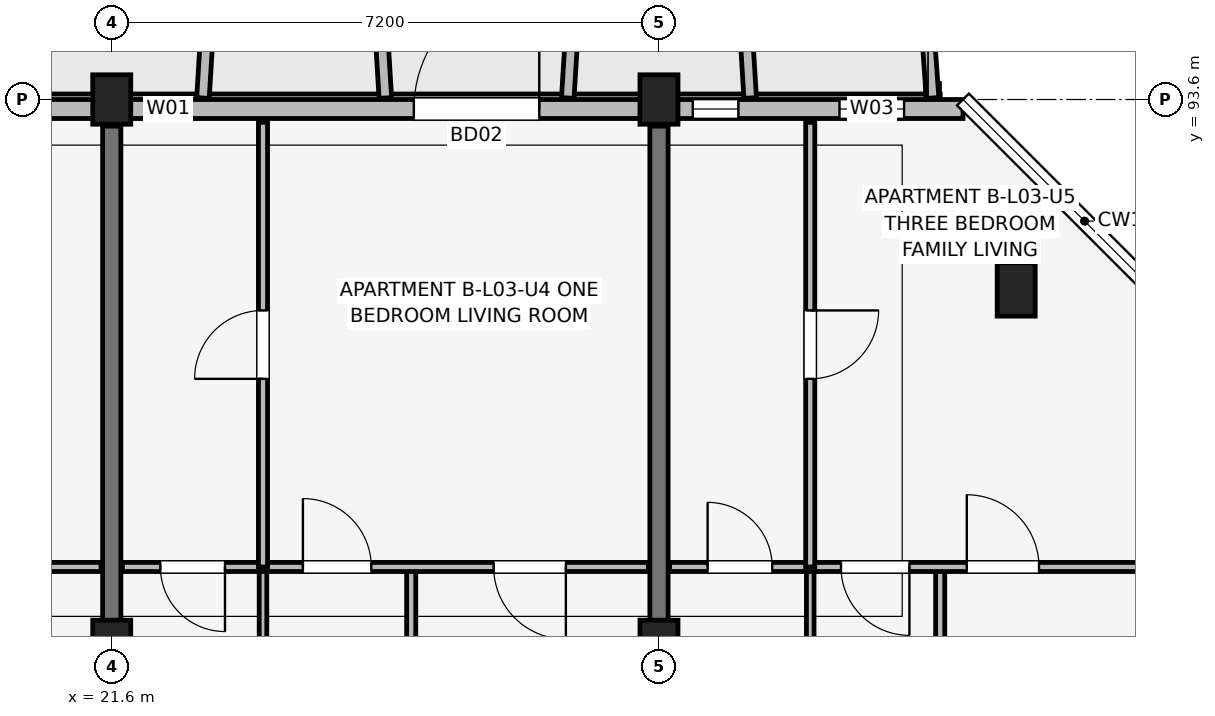
"""IFC4 building model, lengths in metres.
Left out: names, types, materials, properties, quantities, classifications, styles, units other than length and angle.
Written with IfcOpenShell. Run it as: python <this file> out.ifc"""

import sys

from ifc_helpers import new_model, si_unit, direction, frame, frame_2d, origin, origin_2d, place, context, subcontext, project, spatial, rectangle, extrude, element, fill, save


model = new_model("IFC4")
c1 = context("Model", 3, precision=1e-05, world=origin(), true_north=direction((0.0, 1.0)))
c2 = subcontext(c1, "Body", "Model", "MODEL_VIEW")
j1 = project(units=[si_unit("LENGTHUNIT", "METRE"), si_unit("PLANEANGLEUNIT", "RADIAN")], contexts=[c1])
p1 = place(None, origin())
s1 = spatial("IfcSite", under=j1, at=p1, CompositionType="ELEMENT")
p2 = place(p1, origin())
s2 = spatial("IfcBuilding", under=s1, at=p2, CompositionType="ELEMENT")
p3 = place(p2, frame((0.0, 0.0, 11.85)))
s3 = spatial("IfcBuildingStorey", under=s2, at=p3, CompositionType="ELEMENT", Elevation=11.85)
p4 = place(p3, frame((21.6, 86.4, 0.0), z_axis=(0.0, 0.0, 1.0), x_axis=(1.0, 0.0, 0.0)))
e1 = element("IfcColumn", 1, at=p4, inside=s3, PredefinedType="COLUMN", context=c2, shape_type="SweptSolid", body=[
    extrude(rectangle(XDim=0.5, YDim=0.7, at=origin_2d()), origin(), (0.0, 0.0, 1.0), 3.15),
])
p5 = place(p3, frame((21.6, 93.6, 0.0), z_axis=(0.0, 0.0, 1.0), x_axis=(1.0, 0.0, 0.0)))
e2 = element("IfcColumn", 2, at=p5, inside=s3, PredefinedType="COLUMN", context=c2, shape_type="SweptSolid", body=[
    extrude(rectangle(XDim=0.5, YDim=0.65, at=origin_2d()), origin(), (0.0, 0.0, 1.0), 3.15),
])
p6 = place(p3, frame((28.8, 86.4, 0.0), z_axis=(0.0, 0.0, 1.0), x_axis=(1.0, 0.0, 0.0)))
e3 = element("IfcColumn", 3, at=p6, inside=s3, PredefinedType="COLUMN", context=c2, shape_type="SweptSolid", body=[
    extrude(rectangle(XDim=0.5, YDim=0.7, at=origin_2d()), origin(), (0.0, 0.0, 1.0), 3.15),
])
p7 = place(p3, frame((28.8, 93.6, 0.0), z_axis=(0.0, 0.0, 1.0), x_axis=(1.0, 0.0, 0.0)))
e4 = element("IfcColumn", 4, at=p7, inside=s3, PredefinedType="COLUMN", context=c2, shape_type="SweptSolid", body=[
    extrude(rectangle(XDim=0.5, YDim=0.65, at=origin_2d()), origin(), (0.0, 0.0, 1.0), 3.15),
])
p8 = place(p3, frame((33.5, 91.1, 0.0), z_axis=(0.0, 0.0, 1.0), x_axis=(1.0, 0.0, 0.0)))
e5 = element("IfcColumn", 5, at=p8, inside=s3, PredefinedType="COLUMN", context=c2, shape_type="SweptSolid", body=[
    extrude(rectangle(XDim=0.5, YDim=0.7, at=origin_2d()), origin(), (0.0, 0.0, 1.0), 3.15),
])
for number, where, z_axis, x_axis in (
    (6, (21.6, 83.85, 0.0), (0.0, 0.0, 1.0), (0.0, 1.0, 0.0)),
    (7, (28.8, 83.85, 0.0), (0.0, 0.0, 1.0), (0.0, 1.0, 0.0)),
):
    element("IfcWall", number, at=place(p3, frame(where, z_axis=z_axis, x_axis=x_axis)), inside=s3, PredefinedType="SHEAR", context=c2, shape_type="SweptSolid", body=[
        extrude(rectangle(XDim=9.4, YDim=0.24, at=frame_2d((4.7, 0.0))), origin(), (0.0, 0.0, 1.0), 3.15),
    ])
p9 = place(p3, frame((32.8, 93.475, 0.0), z_axis=(0.0, 0.0, 1.0), x_axis=(-1.0, 0.0, 0.0)))
e8 = element("IfcWall", 8, at=p9, inside=s3, PredefinedType="SOLIDWALL", context=c2, shape_type="SweptSolid", body=[
    extrude(rectangle(XDim=29.6, YDim=0.25, at=frame_2d((14.8, 0.0))), origin(), (0.0, 0.0, 1.0), 2.43),
])
p10 = place(p9, frame((21.7, 0.0, 0.0), z_axis=(0.0, 0.0, 1.0), x_axis=(-1.0, 0.0, 0.0)))
e9 = element("IfcOpeningElement", 9, at=p10, cuts=e8, PredefinedType="OPENING", context=c2, shape_type="SweptSolid", body=[
    extrude(rectangle(XDim=1.8, YDim=2.15, at=frame_2d((0.9, 1.075))), frame((0.0, 0.135, 0.0), z_axis=(0.0, -1.0, 0.0), x_axis=(1.0, 0.0, 0.0)), (0.0, 0.0, 1.0), 0.27),
])
p11 = place(p9, frame((7.225, 0.0, 0.0), z_axis=(0.0, 0.0, 1.0), x_axis=(-1.0, 0.0, 0.0)))
e10 = element("IfcOpeningElement", 10, at=p11, cuts=e8, PredefinedType="OPENING", context=c2, shape_type="SweptSolid", body=[
    extrude(rectangle(XDim=1.65, YDim=2.15, at=frame_2d((0.825, 1.075))), frame((0.0, 0.135, 0.0), z_axis=(0.0, -1.0, 0.0), x_axis=(1.0, 0.0, 0.0)), (0.0, 0.0, 1.0), 0.27),
])
p12 = place(p9, frame((26.925, 0.0, 0.67)))
e11 = element("IfcOpeningElement", 11, at=p12, cuts=e8, PredefinedType="OPENING", context=c2, shape_type="SweptSolid", body=[
    extrude(rectangle(XDim=2.15, YDim=1.65, at=frame_2d((1.075, 0.825))), frame((0.0, 0.135, 0.0), z_axis=(0.0, -1.0, 0.0), x_axis=(1.0, 0.0, 0.0)), (0.0, 0.0, 1.0), 0.27),
])
p13 = place(p9, frame((14.925, 0.0, 0.67)))
e12 = element("IfcOpeningElement", 12, at=p13, cuts=e8, PredefinedType="OPENING", context=c2, shape_type="SweptSolid", body=[
    extrude(rectangle(XDim=2.15, YDim=1.65, at=frame_2d((1.075, 0.825))), frame((0.0, 0.135, 0.0), z_axis=(0.0, -1.0, 0.0), x_axis=(1.0, 0.0, 0.0)), (0.0, 0.0, 1.0), 0.27),
])
p14 = place(p9, frame((12.545, 0.0, 0.75)))
e13 = element("IfcOpeningElement", 13, at=p14, cuts=e8, PredefinedType="OPENING", context=c2, shape_type="SweptSolid", body=[
    extrude(rectangle(XDim=1.46, YDim=1.55, at=frame_2d((0.73, 0.775))), frame((0.0, 0.135, 0.0), z_axis=(0.0, -1.0, 0.0), x_axis=(1.0, 0.0, 0.0)), (0.0, 0.0, 1.0), 0.27),
])
p15 = place(p9, frame((10.155, 0.0, 0.75)))
e14 = element("IfcOpeningElement", 14, at=p15, cuts=e8, PredefinedType="OPENING", context=c2, shape_type="SweptSolid", body=[
    extrude(rectangle(XDim=0.6, YDim=1.25, at=frame_2d((0.3, 0.625))), frame((0.0, 0.135, 0.0), z_axis=(0.0, -1.0, 0.0), x_axis=(1.0, 0.0, 0.0)), (0.0, 0.0, 1.0), 0.27),
])
p16 = place(p9, frame((2.955, 0.0, 0.75)))
e15 = element("IfcOpeningElement", 15, at=p16, cuts=e8, PredefinedType="OPENING", context=c2, shape_type="SweptSolid", body=[
    extrude(rectangle(XDim=0.6, YDim=1.25, at=frame_2d((0.3, 0.625))), frame((0.0, 0.135, 0.0), z_axis=(0.0, -1.0, 0.0), x_axis=(1.0, 0.0, 0.0)), (0.0, 0.0, 1.0), 0.27),
])
p17 = place(p9, frame((0.775, 0.0, 0.75)))
e16 = element("IfcOpeningElement", 16, at=p17, cuts=e8, PredefinedType="OPENING", context=c2, shape_type="SweptSolid", body=[
    extrude(rectangle(XDim=0.85, YDim=1.4, at=frame_2d((0.425, 0.7))), frame((0.0, 0.135, 0.0), z_axis=(0.0, -1.0, 0.0), x_axis=(1.0, 0.0, 0.0)), (0.0, 0.0, 1.0), 0.27),
])
for number, where, z_axis, x_axis in (
    (17, (22.8, 93.62, 0.0), (0.0, 0.0, 1.0), (0.061, 0.998, 0.0)),
    (18, (25.2, 93.62, 0.0), (0.0, 0.0, 1.0), (-0.061, 0.998, 0.0)),
    (19, (27.6, 93.62, 0.0), (0.0, 0.0, 1.0), (0.061, 0.998, 0.0)),
):
    element("IfcWall", number, at=place(p3, frame(where, z_axis=z_axis, x_axis=x_axis)), inside=s3, PredefinedType="ELEMENTEDWALL", context=c2, shape_type="SweptSolid", body=[
        extrude(rectangle(XDim=1.964, YDim=0.165, at=frame_2d((0.982, 0.0))), origin(), (0.0, 0.0, 1.0), 2.53),
    ])
p18 = place(p3, frame((30.0, 93.62, 0.0), z_axis=(0.0, 0.0, 1.0), x_axis=(-0.061170732449, 0.998127317276, 0.0)))
e20 = element("IfcWall", 20, at=p18, inside=s3, PredefinedType="ELEMENTEDWALL", context=c2, shape_type="SweptSolid", body=[
    extrude(rectangle(XDim=1.964, YDim=0.165, at=frame_2d((0.982, 0.0))), origin(), (0.0, 0.0, 1.0), 2.95),
])
p19 = place(p3, frame((32.4, 93.62, 0.0), z_axis=(0.0, 0.0, 1.0), x_axis=(-0.071194071069, 0.997462482625, 0.0)))
e21 = element("IfcWall", 21, at=p19, inside=s3, PredefinedType="ELEMENTEDWALL", context=c2, shape_type="SweptSolid", body=[
    extrude(rectangle(XDim=1.965, YDim=0.165, at=frame_2d((0.982, 0.0))), origin(), (0.0, 0.0, 1.0), 2.95),
])
p20 = place(p3, frame((14.54, 87.45, 0.0), z_axis=(0.0, 0.0, 1.0), x_axis=(1.0, 0.0, 0.0)))
e22 = element("IfcWall", 22, at=p20, inside=s3, PredefinedType="PARTITIONING", context=c2, shape_type="SweptSolid", body=[
    extrude(rectangle(XDim=6.92, YDim=0.12, at=frame_2d((3.46, 0.0))), origin(), (0.0, 0.0, 1.0), 2.38),
])
p21 = place(p20, frame((0.5, 0.0, 0.0)))
e23 = element("IfcOpeningElement", 23, at=p21, cuts=e22, PredefinedType="OPENING", context=c2, shape_type="SweptSolid", body=[
    extrude(rectangle(XDim=0.85, YDim=2.08, at=frame_2d((0.425, 1.04))), frame((0.0, 0.07, 0.0), z_axis=(0.0, -1.0, 0.0), x_axis=(1.0, 0.0, 0.0)), (0.0, 0.0, 1.0), 0.14),
])
p22 = place(p20, frame((3.425, 0.0, 0.0), z_axis=(0.0, 0.0, 1.0), x_axis=(-1.0, 0.0, 0.0)))
e24 = element("IfcOpeningElement", 24, at=p22, cuts=e22, PredefinedType="OPENING", context=c2, shape_type="SweptSolid", body=[
    extrude(rectangle(XDim=0.9, YDim=2.08, at=frame_2d((0.45, 1.04))), frame((0.0, 0.07, 0.0), z_axis=(0.0, -1.0, 0.0), x_axis=(1.0, 0.0, 0.0)), (0.0, 0.0, 1.0), 0.14),
])
p23 = place(p20, frame((5.035, 0.0, 0.0)))
e25 = element("IfcOpeningElement", 25, at=p23, cuts=e22, PredefinedType="OPENING", context=c2, shape_type="SweptSolid", body=[
    extrude(rectangle(XDim=0.95, YDim=2.08, at=frame_2d((0.475, 1.04))), frame((0.0, 0.07, 0.0), z_axis=(0.0, -1.0, 0.0), x_axis=(1.0, 0.0, 0.0)), (0.0, 0.0, 1.0), 0.14),
])
p24 = place(p3, frame((23.59, 83.7, 0.0), z_axis=(0.0, 0.0, 1.0), x_axis=(0.0, 1.0, 0.0)))
e26 = element("IfcWall", 26, at=p24, inside=s3, PredefinedType="PARTITIONING", context=c2, shape_type="SweptSolid", body=[
    extrude(rectangle(XDim=3.75, YDim=0.1, at=frame_2d((1.875, 0.0))), origin(), (0.0, 0.0, 1.0), 2.375),
])
p25 = place(p3, frame((25.54, 83.7, 0.0), z_axis=(0.0, 0.0, 1.0), x_axis=(0.0, 1.0, 0.0)))
e27 = element("IfcWall", 27, at=p25, inside=s3, PredefinedType="PARTITIONING", context=c2, shape_type="SweptSolid", body=[
    extrude(rectangle(XDim=3.75, YDim=0.12, at=frame_2d((1.875, 0.0))), origin(), (0.0, 0.0, 1.0), 2.375),
])
p26 = place(p3, frame((21.74, 87.45, 0.0), z_axis=(0.0, 0.0, 1.0), x_axis=(1.0, 0.0, 0.0)))
e28 = element("IfcWall", 28, at=p26, inside=s3, PredefinedType="PARTITIONING", context=c2, shape_type="SweptSolid", body=[
    extrude(rectangle(XDim=6.92, YDim=0.12, at=frame_2d((3.46, 0.0))), origin(), (0.0, 0.0, 1.0), 2.38),
])
p27 = place(p26, frame((1.35, 0.0, 0.0), z_axis=(0.0, 0.0, 1.0), x_axis=(-1.0, 0.0, 0.0)))
e29 = element("IfcOpeningElement", 29, at=p27, cuts=e28, PredefinedType="OPENING", context=c2, shape_type="SweptSolid", body=[
    extrude(rectangle(XDim=0.85, YDim=2.08, at=frame_2d((0.425, 1.04))), frame((0.0, 0.07, 0.0), z_axis=(0.0, -1.0, 0.0), x_axis=(1.0, 0.0, 0.0)), (0.0, 0.0, 1.0), 0.14),
])
p28 = place(p26, frame((2.375, 0.0, 0.0)))
e30 = element("IfcOpeningElement", 30, at=p28, cuts=e28, PredefinedType="OPENING", context=c2, shape_type="SweptSolid", body=[
    extrude(rectangle(XDim=0.9, YDim=2.08, at=frame_2d((0.45, 1.04))), frame((0.0, 0.07, 0.0), z_axis=(0.0, -1.0, 0.0), x_axis=(1.0, 0.0, 0.0)), (0.0, 0.0, 1.0), 0.14),
])
p29 = place(p26, frame((5.835, 0.0, 0.0), z_axis=(0.0, 0.0, 1.0), x_axis=(-1.0, 0.0, 0.0)))
e31 = element("IfcOpeningElement", 31, at=p29, cuts=e28, PredefinedType="OPENING", context=c2, shape_type="SweptSolid", body=[
    extrude(rectangle(XDim=0.95, YDim=2.08, at=frame_2d((0.475, 1.04))), frame((0.0, 0.07, 0.0), z_axis=(0.0, -1.0, 0.0), x_axis=(1.0, 0.0, 0.0)), (0.0, 0.0, 1.0), 0.14),
])
p30 = place(p3, frame((23.59, 87.45, 0.0), z_axis=(0.0, 0.0, 1.0), x_axis=(0.0, 1.0, 0.0)))
e32 = element("IfcWall", 32, at=p30, inside=s3, PredefinedType="PARTITIONING", context=c2, shape_type="SweptSolid", body=[
    extrude(rectangle(XDim=5.85, YDim=0.12, at=frame_2d((2.925, 0.0))), origin(), (0.0, 0.0, 1.0), 2.38),
])
p31 = place(p30, frame((2.475, 0.0, 0.0)))
e33 = element("IfcOpeningElement", 33, at=p31, cuts=e32, PredefinedType="OPENING", context=c2, shape_type="SweptSolid", body=[
    extrude(rectangle(XDim=0.9, YDim=2.08, at=frame_2d((0.45, 1.04))), frame((0.0, 0.07, 0.0), z_axis=(0.0, -1.0, 0.0), x_axis=(1.0, 0.0, 0.0)), (0.0, 0.0, 1.0), 0.14),
])
p32 = place(p3, frame((30.79, 83.7, 0.0), z_axis=(0.0, 0.0, 1.0), x_axis=(0.0, 1.0, 0.0)))
e34 = element("IfcWall", 34, at=p32, inside=s3, PredefinedType="PARTITIONING", context=c2, shape_type="SweptSolid", body=[
    extrude(rectangle(XDim=3.75, YDim=0.1, at=frame_2d((1.875, 0.0))), origin(), (0.0, 0.0, 1.0), 2.375),
])
p33 = place(p3, frame((32.5, 83.7, 0.0), z_axis=(0.0, 0.0, 1.0), x_axis=(0.0, 1.0, 0.0)))
e35 = element("IfcWall", 35, at=p33, inside=s3, PredefinedType="PARTITIONING", context=c2, shape_type="SweptSolid", body=[
    extrude(rectangle(XDim=3.75, YDim=0.12, at=frame_2d((1.875, 0.0))), origin(), (0.0, 0.0, 1.0), 2.375),
])
p34 = place(p3, frame((28.94, 87.45, 0.0), z_axis=(0.0, 0.0, 1.0), x_axis=(1.0, 0.0, 0.0)))
e36 = element("IfcWall", 36, at=p34, inside=s3, PredefinedType="PARTITIONING", context=c2, shape_type="SweptSolid", body=[
    extrude(rectangle(XDim=6.92, YDim=0.12, at=frame_2d((3.46, 0.0))), origin(), (0.0, 0.0, 1.0), 2.38),
])
p35 = place(p34, frame((0.5, 0.0, 0.0)))
e37 = element("IfcOpeningElement", 37, at=p35, cuts=e36, PredefinedType="OPENING", context=c2, shape_type="SweptSolid", body=[
    extrude(rectangle(XDim=0.85, YDim=2.08, at=frame_2d((0.425, 1.04))), frame((0.0, 0.07, 0.0), z_axis=(0.0, -1.0, 0.0), x_axis=(1.0, 0.0, 0.0)), (0.0, 0.0, 1.0), 0.14),
])
p36 = place(p34, frame((3.155, 0.0, 0.0), z_axis=(0.0, 0.0, 1.0), x_axis=(-1.0, 0.0, 0.0)))
e38 = element("IfcOpeningElement", 38, at=p36, cuts=e36, PredefinedType="OPENING", context=c2, shape_type="SweptSolid", body=[
    extrude(rectangle(XDim=0.9, YDim=2.08, at=frame_2d((0.45, 1.04))), frame((0.0, 0.07, 0.0), z_axis=(0.0, -1.0, 0.0), x_axis=(1.0, 0.0, 0.0)), (0.0, 0.0, 1.0), 0.14),
])
p37 = place(p34, frame((3.91, 0.0, 0.0)))
e39 = element("IfcOpeningElement", 39, at=p37, cuts=e36, PredefinedType="OPENING", context=c2, shape_type="SweptSolid", body=[
    extrude(rectangle(XDim=0.95, YDim=2.08, at=frame_2d((0.475, 1.04))), frame((0.0, 0.07, 0.0), z_axis=(0.0, -1.0, 0.0), x_axis=(1.0, 0.0, 0.0)), (0.0, 0.0, 1.0), 0.14),
])
p38 = place(p3, frame((30.79, 87.45, 0.0), z_axis=(0.0, 0.0, 1.0), x_axis=(0.0, 1.0, 0.0)))
e40 = element("IfcWall", 40, at=p38, inside=s3, PredefinedType="PARTITIONING", context=c2, shape_type="SweptSolid", body=[
    extrude(rectangle(XDim=5.85, YDim=0.12, at=frame_2d((2.925, 0.0))), origin(), (0.0, 0.0, 1.0), 2.38),
])
p39 = place(p38, frame((3.375, 0.0, 0.0), z_axis=(0.0, 0.0, 1.0), x_axis=(-1.0, 0.0, 0.0)))
e41 = element("IfcOpeningElement", 41, at=p39, cuts=e40, PredefinedType="OPENING", context=c2, shape_type="SweptSolid", body=[
    extrude(rectangle(XDim=0.9, YDim=2.08, at=frame_2d((0.45, 1.04))), frame((0.0, 0.07, 0.0), z_axis=(0.0, -1.0, 0.0), x_axis=(1.0, 0.0, 0.0)), (0.0, 0.0, 1.0), 0.14),
])
p40 = place(p11, origin())
e42 = element("IfcDoor", 42, at=p40, inside=s3, OperationType="SINGLE_SWING_LEFT", PredefinedType="DOOR", context=c2, shape_type="SweptSolid", body=[
    extrude(rectangle(XDim=1.65, YDim=2.15, at=frame_2d((0.825, 1.075))), frame((0.0, 0.025, 0.0), z_axis=(0.0, -1.0, 0.0), x_axis=(1.0, 0.0, 0.0)), (0.0, 0.0, 1.0), 0.05),
])
fill(e10, e42)
p41 = place(p15, origin())
e43 = element("IfcWindow", 43, at=p41, inside=s3, PartitioningType="SINGLE_PANEL", PredefinedType="WINDOW", context=c2, shape_type="SweptSolid", body=[
    extrude(rectangle(XDim=0.6, YDim=1.25, at=frame_2d((0.3, 0.625))), frame((0.0, 0.03, 0.0), z_axis=(0.0, -1.0, 0.0), x_axis=(1.0, 0.0, 0.0)), (0.0, 0.0, 1.0), 0.06),
])
fill(e14, e43)
p42 = place(p16, origin())
e44 = element("IfcWindow", 44, at=p42, inside=s3, PartitioningType="SINGLE_PANEL", PredefinedType="WINDOW", context=c2, shape_type="SweptSolid", body=[
    extrude(rectangle(XDim=0.6, YDim=1.25, at=frame_2d((0.3, 0.625))), frame((0.0, 0.03, 0.0), z_axis=(0.0, -1.0, 0.0), x_axis=(1.0, 0.0, 0.0)), (0.0, 0.0, 1.0), 0.06),
])
fill(e15, e44)
p43 = place(p17, origin())
e45 = element("IfcWindow", 45, at=p43, inside=s3, PartitioningType="SINGLE_PANEL", PredefinedType="WINDOW", context=c2, shape_type="SweptSolid", body=[
    extrude(rectangle(XDim=0.85, YDim=1.4, at=frame_2d((0.425, 0.7))), frame((0.0, 0.03, 0.0), z_axis=(0.0, -1.0, 0.0), x_axis=(1.0, 0.0, 0.0)), (0.0, 0.0, 1.0), 0.06),
])
fill(e16, e45)
p44 = place(p27, origin())
e46 = element("IfcDoor", 46, at=p44, inside=s3, OperationType="SINGLE_SWING_RIGHT", PredefinedType="DOOR", context=c2, shape_type="SweptSolid", body=[
    extrude(rectangle(XDim=0.85, YDim=2.08, at=frame_2d((0.425, 1.04))), frame((0.0, 0.025, 0.0), z_axis=(0.0, -1.0, 0.0), x_axis=(1.0, 0.0, 0.0)), (0.0, 0.0, 1.0), 0.05),
])
fill(e29, e46)
p45 = place(p28, origin())
e47 = element("IfcDoor", 47, at=p45, inside=s3, OperationType="SINGLE_SWING_LEFT", PredefinedType="DOOR", context=c2, shape_type="SweptSolid", body=[
    extrude(rectangle(XDim=0.9, YDim=2.08, at=frame_2d((0.45, 1.04))), frame((0.0, 0.025, 0.0), z_axis=(0.0, -1.0, 0.0), x_axis=(1.0, 0.0, 0.0)), (0.0, 0.0, 1.0), 0.05),
])
fill(e30, e47)
p46 = place(p29, origin())
e48 = element("IfcDoor", 48, at=p46, inside=s3, OperationType="SINGLE_SWING_RIGHT", PredefinedType="DOOR", context=c2, shape_type="SweptSolid", body=[
    extrude(rectangle(XDim=0.95, YDim=2.08, at=frame_2d((0.475, 1.04))), frame((0.0, 0.025, 0.0), z_axis=(0.0, -1.0, 0.0), x_axis=(1.0, 0.0, 0.0)), (0.0, 0.0, 1.0), 0.05),
])
fill(e31, e48)
p47 = place(p31, origin())
e49 = element("IfcDoor", 49, at=p47, inside=s3, OperationType="SINGLE_SWING_LEFT", PredefinedType="DOOR", context=c2, shape_type="SweptSolid", body=[
    extrude(rectangle(XDim=0.9, YDim=2.08, at=frame_2d((0.45, 1.04))), frame((0.0, 0.025, 0.0), z_axis=(0.0, -1.0, 0.0), x_axis=(1.0, 0.0, 0.0)), (0.0, 0.0, 1.0), 0.05),
])
fill(e33, e49)
p48 = place(p35, origin())
e50 = element("IfcDoor", 50, at=p48, inside=s3, OperationType="SINGLE_SWING_LEFT", PredefinedType="DOOR", context=c2, shape_type="SweptSolid", body=[
    extrude(rectangle(XDim=0.85, YDim=2.08, at=frame_2d((0.425, 1.04))), frame((0.0, 0.025, 0.0), z_axis=(0.0, -1.0, 0.0), x_axis=(1.0, 0.0, 0.0)), (0.0, 0.0, 1.0), 0.05),
])
fill(e37, e50)
p49 = place(p36, origin())
e51 = element("IfcDoor", 51, at=p49, inside=s3, OperationType="SINGLE_SWING_RIGHT", PredefinedType="DOOR", context=c2, shape_type="SweptSolid", body=[
    extrude(rectangle(XDim=0.9, YDim=2.08, at=frame_2d((0.45, 1.04))), frame((0.0, 0.025, 0.0), z_axis=(0.0, -1.0, 0.0), x_axis=(1.0, 0.0, 0.0)), (0.0, 0.0, 1.0), 0.05),
])
fill(e38, e51)
p50 = place(p37, origin())
e52 = element("IfcDoor", 52, at=p50, inside=s3, OperationType="SINGLE_SWING_LEFT", PredefinedType="DOOR", context=c2, shape_type="SweptSolid", body=[
    extrude(rectangle(XDim=0.95, YDim=2.08, at=frame_2d((0.475, 1.04))), frame((0.0, 0.025, 0.0), z_axis=(0.0, -1.0, 0.0), x_axis=(1.0, 0.0, 0.0)), (0.0, 0.0, 1.0), 0.05),
])
fill(e39, e52)
p51 = place(p39, origin())
e53 = element("IfcDoor", 53, at=p51, inside=s3, OperationType="SINGLE_SWING_RIGHT", PredefinedType="DOOR", context=c2, shape_type="SweptSolid", body=[
    extrude(rectangle(XDim=0.9, YDim=2.08, at=frame_2d((0.45, 1.04))), frame((0.0, 0.025, 0.0), z_axis=(0.0, -1.0, 0.0), x_axis=(1.0, 0.0, 0.0)), (0.0, 0.0, 1.0), 0.05),
])
fill(e41, e53)
save(model, sys.argv[1])
